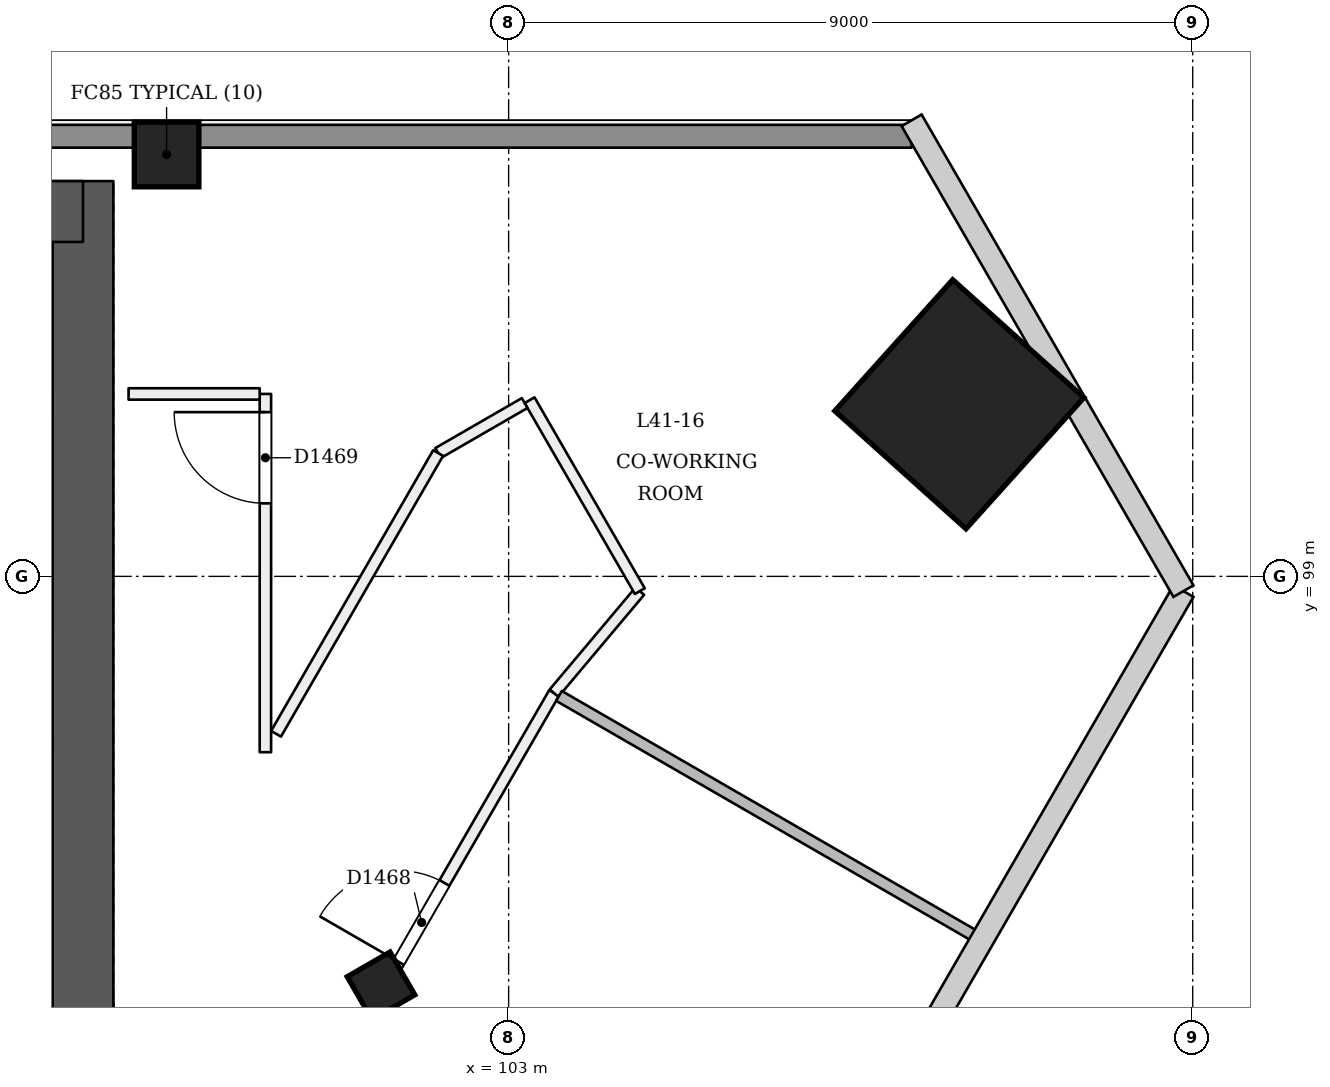
"""IFC4 building model, lengths in metres.
Left out: names, types, materials, properties, quantities, classifications, styles, units other than length and angle.
Written with IfcOpenShell. Run it as: python <this file> out.ifc"""

import sys

from ifc_helpers import new_model, si_unit, direction, frame, frame_2d, origin, origin_2d, place, context, subcontext, project, spatial, rectangle, extrude, element, fill, save


model = new_model("IFC4")
c1 = context("Model", 3, precision=1e-05, world=origin(), true_north=direction((0.0, 1.0)))
c2 = subcontext(c1, "Body", "Model", "MODEL_VIEW")
j1 = project(units=[si_unit("LENGTHUNIT", "METRE"), si_unit("PLANEANGLEUNIT", "RADIAN")], contexts=[c1])
p1 = place(None, origin())
s1 = spatial("IfcSite", under=j1, at=p1, CompositionType="ELEMENT")
p2 = place(p1, origin())
s2 = spatial("IfcBuilding", under=s1, at=p2, CompositionType="ELEMENT")
p3 = place(p2, frame((0.0, 0.0, 160.2)))
s3 = spatial("IfcBuildingStorey", under=s2, at=p3, CompositionType="ELEMENT", Elevation=160.2)
p4 = place(p3, frame((72.6, 93.0, 0.0), z_axis=(0.0, 0.0, 1.0), x_axis=(1.0, 0.0, 0.0)))
e1 = element("IfcWall", 1, at=p4, inside=s3, PredefinedType="SHEAR", context=c2, shape_type="SweptSolid", body=[
    extrude(rectangle(XDim=25.2, YDim=0.8, at=frame_2d((12.6, 0.0))), origin(), (0.0, 0.0, 1.0), 3.6),
])
p5 = place(p4, frame((1.2, 0.0, 0.0)))
e2 = element("IfcOpeningElement", 2, at=p5, cuts=e1, PredefinedType="OPENING", context=c2, shape_type="SweptSolid", body=[
    extrude(rectangle(XDim=1.2, YDim=2.1, at=frame_2d((0.6, 1.05))), frame((0.0, 0.411, 0.0), z_axis=(0.0, -1.0, 0.0), x_axis=(1.0, 0.0, 0.0)), (0.0, 0.0, 1.0), 0.821),
])
p6 = place(p4, frame((3.4, 0.0, 0.0)))
e3 = element("IfcOpeningElement", 3, at=p6, cuts=e1, PredefinedType="OPENING", context=c2, shape_type="SweptSolid", body=[
    extrude(rectangle(XDim=1.2, YDim=2.1, at=frame_2d((0.6, 1.05))), frame((0.0, 0.411, 0.0), z_axis=(0.0, -1.0, 0.0), x_axis=(1.0, 0.0, 0.0)), (0.0, 0.0, 1.0), 0.821),
])
p7 = place(p4, frame((13.4, 0.0, 0.0)))
e4 = element("IfcOpeningElement", 4, at=p7, cuts=e1, PredefinedType="OPENING", context=c2, shape_type="SweptSolid", body=[
    extrude(rectangle(XDim=1.2, YDim=2.1, at=frame_2d((0.6, 1.05))), frame((0.0, 0.411, 0.0), z_axis=(0.0, -1.0, 0.0), x_axis=(1.0, 0.0, 0.0)), (0.0, 0.0, 1.0), 0.821),
])
p8 = place(p4, frame((15.712, 0.0, 0.0)))
e5 = element("IfcOpeningElement", 5, at=p8, cuts=e1, PredefinedType="OPENING", context=c2, shape_type="SweptSolid", body=[
    extrude(rectangle(XDim=1.0, YDim=2.1, at=frame_2d((0.5, 1.05))), frame((0.0, 0.411, 0.0), z_axis=(0.0, -1.0, 0.0), x_axis=(1.0, 0.0, 0.0)), (0.0, 0.0, 1.0), 0.821),
])
p9 = place(p4, frame((19.15, 0.0, 0.0)))
e6 = element("IfcOpeningElement", 6, at=p9, cuts=e1, PredefinedType="OPENING", context=c2, shape_type="SweptSolid", body=[
    extrude(rectangle(XDim=1.0, YDim=2.1, at=frame_2d((0.5, 1.05))), frame((0.0, 0.411, 0.0), z_axis=(0.0, -1.0, 0.0), x_axis=(1.0, 0.0, 0.0)), (0.0, 0.0, 1.0), 0.821),
])
p10 = place(p4, frame((22.688, 0.0, 0.0)))
e7 = element("IfcOpeningElement", 7, at=p10, cuts=e1, PredefinedType="OPENING", context=c2, shape_type="SweptSolid", body=[
    extrude(rectangle(XDim=1.0, YDim=2.1, at=frame_2d((0.5, 1.05))), frame((0.0, 0.411, 0.0), z_axis=(0.0, -1.0, 0.0), x_axis=(1.0, 0.0, 0.0)), (0.0, 0.0, 1.0), 0.821),
])
p11 = place(p3, frame((97.4, 93.0, 0.0), z_axis=(0.0, 0.0, 1.0), x_axis=(0.0, 1.0, 0.0)))
e8 = element("IfcWall", 8, at=p11, inside=s3, PredefinedType="SHEAR", context=c2, shape_type="SweptSolid", body=[
    extrude(rectangle(XDim=11.2, YDim=0.8, at=frame_2d((5.6, 0.0))), origin(), (0.0, 0.0, 1.0), 3.6),
])
p12 = place(p3, frame((97.4, 103.8, 0.0), z_axis=(0.0, 0.0, 1.0), x_axis=(-1.0, 0.0, 0.0)))
e9 = element("IfcWall", 9, at=p12, inside=s3, PredefinedType="SHEAR", context=c2, shape_type="SweptSolid", body=[
    extrude(rectangle(XDim=25.2, YDim=0.8, at=frame_2d((12.6, 0.0))), origin(), (0.0, 0.0, 1.0), 3.6),
])
p13 = place(p3, frame((101.348, 93.567, -0.02), z_axis=(-0.02215369191, 0.038413282303, 0.999016333038), x_axis=(-0.500652744536, -0.86536421959, 0.022171983253)))
e10 = element("IfcColumn", 10, at=p13, inside=s3, PredefinedType="COLUMN", context=c2, shape_type="SweptSolid", body=[
    extrude(rectangle(XDim=0.65, YDim=0.65, at=origin_2d()), origin(), (0.0, 0.0, 1.0), 3.604),
])
p14 = place(p3, frame((108.964, 101.253, 0.0), z_axis=(-0.028401796786, 0.009286506348, 0.999553449666), x_axis=(0.498881183205, -0.866385379601, 0.022224739778)))
e11 = element("IfcColumn", 11, at=p14, inside=s3, PredefinedType="COLUMN", context=c2, shape_type="SweptSolid", body=[
    extrude(rectangle(XDim=2.32, YDim=2.32, at=origin_2d()), origin(), (0.0, 0.0, 1.0), 3.602),
])
p15 = place(p3, frame((98.5, 104.55, 0.0), z_axis=(0.0, 0.0, 1.0), x_axis=(1.0, 0.0, 0.0)))
e12 = element("IfcColumn", 12, at=p15, inside=s3, PredefinedType="COLUMN", context=c2, shape_type="SweptSolid", body=[
    extrude(rectangle(XDim=0.85, YDim=0.85, at=origin_2d()), origin(), (0.0, 0.0, 1.0), 3.6),
])
p16 = place(p3, frame((99.8, 90.887, 0.0), z_axis=(0.0, 0.0, 1.0), x_axis=(0.499986781806, 0.866033035178, 0.0)))
e13 = element("IfcWall", 13, at=p16, inside=s3, PredefinedType="PARTITIONING", context=c2, shape_type="SweptSolid", body=[
    extrude(rectangle(XDim=7.595, YDim=0.15, at=frame_2d((3.798, 0.0))), origin(), (0.0, 0.0, 1.0), 2.75),
])
p17 = place(p16, frame((3.511, 0.0, 0.0)))
e14 = element("IfcOpeningElement", 14, at=p17, cuts=e13, PredefinedType="OPENING", context=c2, shape_type="SweptSolid", body=[
    extrude(rectangle(XDim=1.2, YDim=2.1, at=frame_2d((0.6, 1.05))), frame((0.0, 0.085, 0.0), z_axis=(0.0, -1.0, 0.0), x_axis=(1.0, 0.0, 0.0)), (0.0, 0.0, 1.0), 0.171),
])
p18 = place(p3, frame((103.598, 97.465, 0.0), z_axis=(0.0, 0.0, 1.0), x_axis=(0.643535028364, 0.765416662524, 0.0)))
e15 = element("IfcWall", 15, at=p18, inside=s3, PredefinedType="PARTITIONING", context=c2, shape_type="SweptSolid", body=[
    extrude(rectangle(XDim=1.753, YDim=0.15, at=frame_2d((0.876, 0.0))), origin(), (0.0, 0.0, 1.0), 3.15),
])
p19 = place(p3, frame((104.726, 98.806, 0.0), z_axis=(0.0, 0.0, 1.0), x_axis=(-0.499987231761, 0.866032775405, 0.0)))
e16 = element("IfcWall", 16, at=p19, inside=s3, PredefinedType="PARTITIONING", context=c2, shape_type="SweptSolid", body=[
    extrude(rectangle(XDim=2.9, YDim=0.15, at=frame_2d((1.45, 0.0))), origin(), (0.0, 0.0, 1.0), 3.15),
])
p20 = place(p3, frame((103.211, 101.28, 0.0), z_axis=(0.0, 0.0, 1.0), x_axis=(-0.866074224396, -0.499915430684, 0.0)))
e17 = element("IfcWall", 17, at=p20, inside=s3, PredefinedType="PARTITIONING", context=c2, shape_type="SweptSolid", body=[
    extrude(rectangle(XDim=1.314, YDim=0.15, at=frame_2d((0.657, 0.0))), origin(), (0.0, 0.0, 1.0), 3.15),
])
p21 = place(p3, frame((102.073, 100.623, 0.0), z_axis=(0.0, 0.0, 1.0), x_axis=(-0.499986710104, -0.866033076574, 0.0)))
e18 = element("IfcWall", 18, at=p21, inside=s3, PredefinedType="PARTITIONING", context=c2, shape_type="SweptSolid", body=[
    extrude(rectangle(XDim=4.265, YDim=0.15, at=frame_2d((2.133, 0.0))), origin(), (0.0, 0.0, 1.0), 3.15),
])
p22 = place(p3, frame((99.8, 96.687, 0.0), z_axis=(0.0, 0.0, 1.0), x_axis=(0.0, 1.0, 0.0)))
e19 = element("IfcWall", 19, at=p22, inside=s3, PredefinedType="PARTITIONING", context=c2, shape_type="SweptSolid", body=[
    extrude(rectangle(XDim=4.713, YDim=0.15, at=frame_2d((2.356, 0.0))), origin(), (0.0, 0.0, 1.0), 3.15),
])
p23 = place(p22, frame((3.274, 0.0, 0.0)))
e20 = element("IfcOpeningElement", 20, at=p23, cuts=e19, PredefinedType="OPENING", context=c2, shape_type="SweptSolid", body=[
    extrude(rectangle(XDim=1.2, YDim=2.1, at=frame_2d((0.6, 1.05))), frame((0.0, 0.085, 0.0), z_axis=(0.0, -1.0, 0.0), x_axis=(1.0, 0.0, 0.0)), (0.0, 0.0, 1.0), 0.171),
])
p24 = place(p3, frame((99.725, 101.4, 0.0), z_axis=(0.0, 0.0, 1.0), x_axis=(-1.0, 0.0, 0.0)))
e21 = element("IfcWall", 21, at=p24, inside=s3, PredefinedType="PARTITIONING", context=c2, shape_type="SweptSolid", body=[
    extrude(rectangle(XDim=1.725, YDim=0.15, at=frame_2d((0.863, 0.0))), origin(), (0.0, 0.0, 1.0), 3.15),
])
p25 = place(p3, frame((109.14, 94.265, 0.0), z_axis=(0.0, 0.0, 1.0), x_axis=(-0.866025537322, 0.499999768706, 0.0)))
e22 = element("IfcWall", 22, at=p25, inside=s3, PredefinedType="PARTITIONING", context=c2, shape_type="SweptSolid", body=[
    extrude(rectangle(XDim=6.325, YDim=0.15, at=frame_2d((3.163, 0.0))), origin(), (0.0, 0.0, 1.0), 2.65),
])
p26 = place(p3, frame((61.698, 104.79, 0.0), z_axis=(0.0, 0.0, 1.0), x_axis=(1.0, 0.0, 0.0)))
e23 = element("IfcWall", 23, at=p26, inside=s3, PredefinedType="SOLIDWALL", context=c2, shape_type="SweptSolid", body=[
    extrude(rectangle(XDim=46.604, YDim=0.3, at=frame_2d((23.302, 0.0))), origin(), (0.0, 0.0, 1.0), 2.65),
])
p27 = place(p17, origin())
e24 = element("IfcDoor", 24, at=p27, inside=s3, OperationType="SINGLE_SWING_LEFT", PredefinedType="NOTDEFINED", context=c2, shape_type="SweptSolid", body=[
    extrude(rectangle(XDim=1.2, YDim=2.1, at=frame_2d((0.6, 1.05))), frame((0.0, 0.025, 0.0), z_axis=(0.0, -1.0, 0.0), x_axis=(1.0, 0.0, 0.0)), (0.0, 0.0, 1.0), 0.05),
])
fill(e14, e24)
p28 = place(p23, origin())
e25 = element("IfcDoor", 25, at=p28, inside=s3, OperationType="SINGLE_SWING_RIGHT", PredefinedType="NOTDEFINED", context=c2, shape_type="SweptSolid", body=[
    extrude(rectangle(XDim=1.2, YDim=2.1, at=frame_2d((0.6, 1.05))), frame((0.0, 0.025, 0.0), z_axis=(0.0, -1.0, 0.0), x_axis=(1.0, 0.0, 0.0)), (0.0, 0.0, 1.0), 0.05),
])
fill(e20, e25)
save(model, sys.argv[1])
